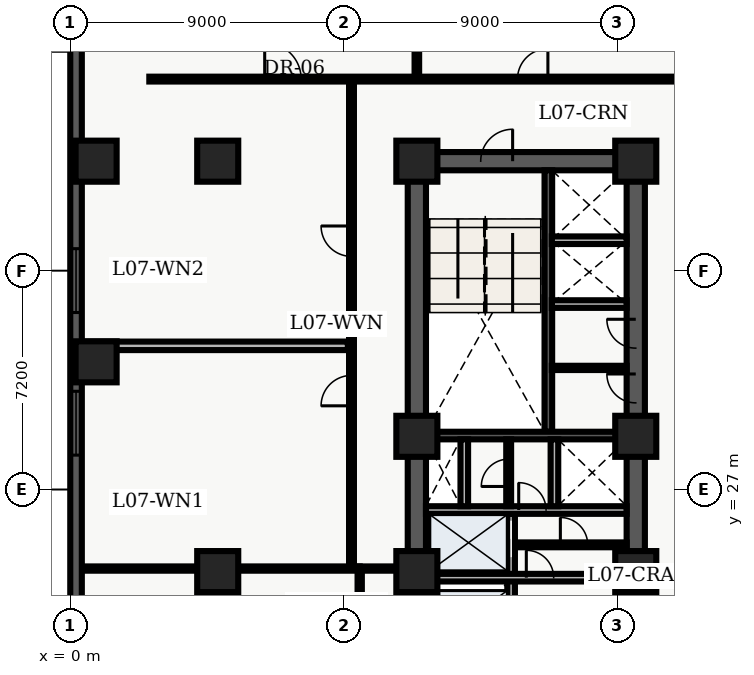
"""IFC4 building model, lengths in metres.
Left out: names, types, materials, properties, quantities, classifications, styles, units other than length and angle.
Written with IfcOpenShell. Run it as: python <this file> out.ifc"""

import sys

from ifc_helpers import new_model, entity, si_unit, converted_unit, direction, frame, origin_with_axes, origin_2d_with_axis, place, context, subcontext, project, spatial, polyline, rectangle, outline, extrude, element, fill, save


model = new_model("IFC4")
c1 = context("Model", 3, precision=1e-05, world=origin_with_axes(), true_north=direction((0.0, 1.0)))
c2 = subcontext(c1, "Body", "Model", "MODEL_VIEW")
j1 = project(units=[si_unit("LENGTHUNIT", "METRE"), converted_unit("PLANEANGLEUNIT", "DEGREE", entity("IfcPlaneAngleMeasure", 0.017), si_unit("PLANEANGLEUNIT", "RADIAN"), dimensions=[0, 0, 0, 0, 0, 0, 0])], contexts=[c1])
p1 = place(None, origin_with_axes())
s1 = spatial("IfcSite", under=j1, at=p1, CompositionType="ELEMENT")
p2 = place(p1, origin_with_axes())
s2 = spatial("IfcBuilding", under=s1, at=p2, CompositionType="ELEMENT")
p3 = place(p2, frame((0.0, 0.0, 32.7), z_axis=(0.0, 0.0, 1.0), x_axis=(1.0, 0.0, 0.0)))
s3 = spatial("IfcBuildingStorey", under=s2, at=p3, CompositionType="ELEMENT", Elevation=32.7)
p4 = place(p3, frame((11.4, 10.8, 0.0), z_axis=(0.0, 0.0, 1.0), x_axis=(0.0, 1.0, 0.0)))
e1 = element("IfcWall", 1, at=p4, inside=s3, PredefinedType="SHEAR", context=c2, shape_type="SweptSolid", body=[
    extrude(outline(polyline([(0.0, -0.3), (27.0, -0.3), (27.0, 0.3), (0.0, 0.3), (0.0, -0.3)])), origin_with_axes(), (0.0, 0.0, 1.0), 3.66),
])
p5 = place(p3, frame((11.4, 37.8, 0.0), z_axis=(0.0, 0.0, 1.0), x_axis=(1.0, 0.0, 0.0)))
e2 = element("IfcWall", 2, at=p5, inside=s3, PredefinedType="SHEAR", context=c2, shape_type="SweptSolid", body=[
    extrude(outline(polyline([(0.0, -0.3), (7.2, -0.3), (7.2, 0.3), (0.0, 0.3), (0.0, -0.3)])), origin_with_axes(), (0.0, 0.0, 1.0), 3.66),
])
p6 = place(p5, frame((2.625, 0.0, 0.0), z_axis=(0.0, 0.0, 1.0), x_axis=(1.0, 0.0, 0.0)))
e3 = element("IfcOpeningElement", 3, at=p6, cuts=e2, PredefinedType="OPENING", context=c2, shape_type="SweptSolid", body=[
    extrude(rectangle(XDim=1.05, YDim=0.62, at=origin_2d_with_axis()), origin_with_axes(), (0.0, 0.0, 1.0), 2.15),
])
p7 = place(p3, frame((18.6, 10.8, 0.0), z_axis=(0.0, 0.0, 1.0), x_axis=(0.0, 1.0, 0.0)))
e4 = element("IfcWall", 4, at=p7, inside=s3, PredefinedType="SHEAR", context=c2, shape_type="SweptSolid", body=[
    extrude(outline(polyline([(0.0, -0.3), (13.5, -0.3), (13.5, 0.3), (0.0, 0.3), (0.0, -0.3)])), origin_with_axes(), (0.0, 0.0, 1.0), 3.66),
])
p8 = place(p7, frame((1.3, 0.0, 0.0), z_axis=(0.0, 0.0, 1.0), x_axis=(1.0, 0.0, 0.0)))
e5 = element("IfcOpeningElement", 5, at=p8, cuts=e4, PredefinedType="OPENING", context=c2, shape_type="SweptSolid", body=[
    extrude(rectangle(XDim=1.1, YDim=0.62, at=origin_2d_with_axis()), origin_with_axes(), (0.0, 0.0, 1.0), 2.15),
])
p9 = place(p7, frame((3.4, 0.0, 0.0), z_axis=(0.0, 0.0, 1.0), x_axis=(1.0, 0.0, 0.0)))
e6 = element("IfcOpeningElement", 6, at=p9, cuts=e4, PredefinedType="OPENING", context=c2, shape_type="SweptSolid", body=[
    extrude(rectangle(XDim=1.1, YDim=0.62, at=origin_2d_with_axis()), origin_with_axes(), (0.0, 0.0, 1.0), 2.15),
])
p10 = place(p7, frame((11.125, 0.0, 0.0), z_axis=(0.0, 0.0, 1.0), x_axis=(1.0, 0.0, 0.0)))
e7 = element("IfcOpeningElement", 7, at=p10, cuts=e4, PredefinedType="OPENING", context=c2, shape_type="SweptSolid", body=[
    extrude(rectangle(XDim=1.05, YDim=0.62, at=origin_2d_with_axis()), origin_with_axes(), (0.0, 0.0, 1.0), 2.15),
])
p11 = place(p3, frame((18.6, 24.3, 0.0), z_axis=(0.0, 0.0, 1.0), x_axis=(0.0, 1.0, 0.0)))
e8 = element("IfcWall", 8, at=p11, inside=s3, PredefinedType="SHEAR", context=c2, shape_type="SweptSolid", body=[
    extrude(outline(polyline([(0.0, -0.3), (13.5, -0.3), (13.5, 0.3), (0.0, 0.3), (0.0, -0.3)])), origin_with_axes(), (0.0, 0.0, 1.0), 3.66),
])
p12 = place(p11, frame((6.025, 0.0, 0.0), z_axis=(0.0, 0.0, 1.0), x_axis=(1.0, 0.0, 0.0)))
e9 = element("IfcOpeningElement", 9, at=p12, cuts=e8, PredefinedType="OPENING", context=c2, shape_type="SweptSolid", body=[
    extrude(rectangle(XDim=0.95, YDim=0.62, at=origin_2d_with_axis()), origin_with_axes(), (0.0, 0.0, 1.0), 2.15),
])
p13 = place(p11, frame((7.825, 0.0, 0.0), z_axis=(0.0, 0.0, 1.0), x_axis=(1.0, 0.0, 0.0)))
e10 = element("IfcOpeningElement", 10, at=p13, cuts=e8, PredefinedType="OPENING", context=c2, shape_type="SweptSolid", body=[
    extrude(rectangle(XDim=0.95, YDim=0.62, at=origin_2d_with_axis()), origin_with_axes(), (0.0, 0.0, 1.0), 2.15),
])
p14 = place(p3, frame((15.725, 28.9, 0.0), z_axis=(0.0, 0.0, 1.0), x_axis=(0.0, 1.0, 0.0)))
e11 = element("IfcWall", 11, at=p14, inside=s3, PredefinedType="SHEAR", context=c2, shape_type="SweptSolid", body=[
    extrude(outline(polyline([(0.0, -0.125), (8.6, -0.125), (8.6, 0.125), (0.0, 0.125), (0.0, -0.125)])), origin_with_axes(), (0.0, 0.0, 1.0), 3.66),
])
p15 = place(p3, frame((11.7, 28.775, 0.0), z_axis=(0.0, 0.0, 1.0), x_axis=(1.0, 0.0, 0.0)))
e12 = element("IfcWall", 12, at=p15, inside=s3, PredefinedType="SHEAR", context=c2, shape_type="SweptSolid", body=[
    extrude(outline(polyline([(0.0, -0.125), (6.6, -0.125), (6.6, 0.125), (0.0, 0.125), (0.0, -0.125)])), origin_with_axes(), (0.0, 0.0, 1.0), 3.66),
])
p16 = place(p3, frame((14.5, 19.95, 0.0), z_axis=(0.0, 0.0, 1.0), x_axis=(0.0, 1.0, 0.0)))
e13 = element("IfcWall", 13, at=p16, inside=s3, PredefinedType="SOLIDWALL", context=c2, shape_type="SweptSolid", body=[
    extrude(outline(polyline([(0.0, -0.125), (6.25, -0.125), (6.25, 0.125), (0.0, 0.125), (0.0, -0.125)])), origin_with_axes(), (0.0, 0.0, 1.0), 2.7),
])
p17 = place(p16, frame((1.025, 0.0, 0.0), z_axis=(0.0, 0.0, 1.0), x_axis=(1.0, 0.0, 0.0)))
e14 = element("IfcOpeningElement", 14, at=p17, cuts=e13, PredefinedType="OPENING", context=c2, shape_type="SweptSolid", body=[
    extrude(rectangle(XDim=1.1, YDim=0.27, at=origin_2d_with_axis()), origin_with_axes(), (0.0, 0.0, 1.0), 2.15),
])
p18 = place(p16, frame((2.975, 0.0, 0.0), z_axis=(0.0, 0.0, 1.0), x_axis=(1.0, 0.0, 0.0)))
e15 = element("IfcOpeningElement", 15, at=p18, cuts=e13, PredefinedType="OPENING", context=c2, shape_type="SweptSolid", body=[
    extrude(rectangle(XDim=1.1, YDim=0.27, at=origin_2d_with_axis()), origin_with_axes(), (0.0, 0.0, 1.0), 2.15),
])
p19 = place(p16, frame((5.425, 0.0, 0.0), z_axis=(0.0, 0.0, 1.0), x_axis=(1.0, 0.0, 0.0)))
e16 = element("IfcOpeningElement", 16, at=p19, cuts=e13, PredefinedType="OPENING", context=c2, shape_type="SweptSolid", body=[
    extrude(rectangle(XDim=1.2, YDim=0.27, at=origin_2d_with_axis()), origin_with_axes(), (0.0, 0.0, 1.0), 2.15),
])
p20 = place(p3, frame((11.7, 24.1, 0.0), z_axis=(0.0, 0.0, 1.0), x_axis=(1.0, 0.0, 0.0)))
e17 = element("IfcWall", 17, at=p20, inside=s3, PredefinedType="SOLIDWALL", context=c2, shape_type="SweptSolid", body=[
    extrude(outline(polyline([(0.0, -0.125), (6.6, -0.125), (6.6, 0.125), (0.0, 0.125), (0.0, -0.125)])), origin_with_axes(), (0.0, 0.0, 1.0), 2.7),
])
p21 = place(p20, frame((3.75, 0.0, 0.0), z_axis=(0.0, 0.0, 1.0), x_axis=(1.0, 0.0, 0.0)))
e18 = element("IfcOpeningElement", 18, at=p21, cuts=e17, PredefinedType="OPENING", context=c2, shape_type="SweptSolid", body=[
    extrude(rectangle(XDim=0.9, YDim=0.27, at=origin_2d_with_axis()), origin_with_axes(), (0.0, 0.0, 1.0), 2.15),
])
p22 = place(p3, frame((11.7, 26.325, 0.0), z_axis=(0.0, 0.0, 1.0), x_axis=(1.0, 0.0, 0.0)))
e19 = element("IfcWall", 19, at=p22, inside=s3, PredefinedType="SOLIDWALL", context=c2, shape_type="SweptSolid", body=[
    extrude(outline(polyline([(0.0, -0.125), (6.6, -0.125), (6.6, 0.125), (0.0, 0.125), (0.0, -0.125)])), origin_with_axes(), (0.0, 0.0, 1.0), 2.7),
])
p23 = place(p22, frame((3.5, 0.0, 0.0), z_axis=(0.0, 0.0, 1.0), x_axis=(1.0, 0.0, 0.0)))
e20 = element("IfcOpeningElement", 20, at=p23, cuts=e19, PredefinedType="OPENING", context=c2, shape_type="SweptSolid", body=[
    extrude(rectangle(XDim=0.9, YDim=0.27, at=origin_2d_with_axis()), origin_with_axes(), (0.0, 0.0, 1.0), 2.15),
])
for number, where, z_axis, x_axis in (
    (21, (12.96, 26.45, 0.0), (0.0, 0.0, 1.0), (0.0, 1.0, 0.0)),
    (22, (15.925, 26.45, 0.0), (0.0, 0.0, 1.0), (0.0, 1.0, 0.0)),
):
    element("IfcWall", number, at=place(p3, frame(where, z_axis=z_axis, x_axis=x_axis)), inside=s3, PredefinedType="SOLIDWALL", context=c2, shape_type="SweptSolid", body=[
        extrude(outline(polyline([(0.0, -0.125), (2.2, -0.125), (2.2, 0.125), (0.0, 0.125), (0.0, -0.125)])), origin_with_axes(), (0.0, 0.0, 1.0), 2.7),
    ])
for number, where, z_axis, x_axis in (
    (23, (11.4, 24.3, 0.0), (0.0, 0.0, 1.0), (1.0, 0.0, 0.0)),
    (24, (11.4, 28.75, 0.0), (0.0, 0.0, 1.0), (1.0, 0.0, 0.0)),
    (25, (11.4, 37.8, 0.0), (0.0, 0.0, 1.0), (1.0, 0.0, 0.0)),
    (26, (18.6, 24.3, 0.0), (0.0, 0.0, 1.0), (1.0, 0.0, 0.0)),
    (27, (18.6, 28.75, 0.0), (0.0, 0.0, 1.0), (1.0, 0.0, 0.0)),
    (28, (18.6, 37.8, 0.0), (0.0, 0.0, 1.0), (1.0, 0.0, 0.0)),
    (29, (4.85, 24.3, 0.0), (0.0, 0.0, 1.0), (1.0, 0.0, 0.0)),
    (30, (4.85, 37.8, 0.0), (0.0, 0.0, 1.0), (1.0, 0.0, 0.0)),
    (31, (0.85, 31.2, 0.0), (0.0, 0.0, 1.0), (1.0, 0.0, 0.0)),
    (32, (0.85, 37.8, 0.0), (0.0, 0.0, 1.0), (1.0, 0.0, 0.0)),
):
    element("IfcColumn", number, at=place(p3, frame(where, z_axis=z_axis, x_axis=x_axis)), inside=s3, PredefinedType="COLUMN", context=c2, shape_type="SweptSolid", body=[
        extrude(rectangle(XDim=1.35, YDim=1.35, at=origin_2d_with_axis()), origin_with_axes(), (0.0, 0.0, 1.0), 3.9),
    ])
p24 = place(p3, frame((14.62, 25.18, 0.0), z_axis=(0.0, 0.0, 1.0), x_axis=(1.0, 0.0, 0.0)))
e33 = element("IfcWall", 33, at=p24, inside=s3, PredefinedType="PARTITIONING", context=c2, shape_type="SweptSolid", body=[
    extrude(outline(polyline([(0.0, -0.08), (3.68, -0.08), (3.68, 0.08), (0.0, 0.08), (0.0, -0.08)])), origin_with_axes(), (0.0, 0.0, 1.0), 2.7),
])
p25 = place(p24, frame((1.95, 0.0, 0.0), z_axis=(0.0, 0.0, 1.0), x_axis=(1.0, 0.0, 0.0)))
e34 = element("IfcOpeningElement", 34, at=p25, cuts=e33, PredefinedType="OPENING", context=c2, shape_type="SweptSolid", body=[
    extrude(rectangle(XDim=0.9, YDim=0.18, at=origin_2d_with_axis()), origin_with_axes(), (0.0, 0.0, 1.0), 2.15),
])
p26 = place(p3, frame((14.42, 26.45, 0.0), z_axis=(0.0, 0.0, 1.0), x_axis=(0.0, 1.0, 0.0)))
e35 = element("IfcWall", 35, at=p26, inside=s3, PredefinedType="PARTITIONING", context=c2, shape_type="SweptSolid", body=[
    extrude(outline(polyline([(0.0, -0.08), (2.2, -0.08), (2.2, 0.08), (0.0, 0.08), (0.0, -0.08)])), origin_with_axes(), (0.0, 0.0, 1.0), 2.7),
])
p27 = place(p26, frame((1.1, 0.0, 0.0), z_axis=(0.0, 0.0, 1.0), x_axis=(1.0, 0.0, 0.0)))
e36 = element("IfcOpeningElement", 36, at=p27, cuts=e35, PredefinedType="OPENING", context=c2, shape_type="SweptSolid", body=[
    extrude(rectangle(XDim=0.9, YDim=0.18, at=origin_2d_with_axis()), origin_with_axes(), (0.0, 0.0, 1.0), 2.15),
])
for number, where, z_axis, x_axis in (
    (37, (15.84, 33.1, 0.0), (0.0, 0.0, 1.0), (1.0, 0.0, 0.0)),
    (38, (15.84, 35.2, 0.0), (0.0, 0.0, 1.0), (1.0, 0.0, 0.0)),
):
    element("IfcWall", number, at=place(p3, frame(where, z_axis=z_axis, x_axis=x_axis)), inside=s3, PredefinedType="SOLIDWALL", context=c2, shape_type="SweptSolid", body=[
        extrude(outline(polyline([(0.0, -0.125), (2.46, -0.125), (2.46, 0.125), (0.0, 0.125), (0.0, -0.125)])), origin_with_axes(), (0.0, 0.0, 1.0), 2.7),
    ])
p28 = place(p3, frame((15.84, 31.0, 0.0), z_axis=(0.0, 0.0, 1.0), x_axis=(1.0, 0.0, 0.0)))
e39 = element("IfcWall", 39, at=p28, inside=s3, PredefinedType="PARTITIONING", context=c2, shape_type="SweptSolid", body=[
    extrude(outline(polyline([(0.0, -0.07), (2.46, -0.07), (2.46, 0.07), (0.0, 0.07), (0.0, -0.07)])), origin_with_axes(), (0.0, 0.0, 1.0), 2.7),
])
p29 = place(p3, frame((9.52, 20.4, 0.0), z_axis=(0.0, 0.0, 1.0), x_axis=(0.0, 1.0, 0.0)))
e40 = element("IfcWall", 40, at=p29, inside=s3, PredefinedType="PARTITIONING", context=c2, shape_type="SweptSolid", body=[
    extrude(outline(polyline([(0.0, -0.07), (4.0, -0.07), (4.0, 0.07), (0.0, 0.07), (0.0, -0.07)])), origin_with_axes(), (0.0, 0.0, 1.0), 2.7),
])
p30 = place(p3, frame((9.52, 24.4, 0.0), z_axis=(0.0, 0.0, 1.0), x_axis=(1.0, 0.0, 0.0)))
e41 = element("IfcWall", 41, at=p30, inside=s3, PredefinedType="PARTITIONING", context=c2, shape_type="SweptSolid", body=[
    extrude(outline(polyline([(0.0, -0.07), (1.58, -0.07), (1.58, 0.07), (0.0, 0.07), (0.0, -0.07)])), origin_with_axes(), (0.0, 0.0, 1.0), 2.7),
])
p31 = place(p3, frame((2.6, 40.5, 0.0), z_axis=(0.0, 0.0, 1.0), x_axis=(1.0, 0.0, 0.0)))
e42 = element("IfcWall", 42, at=p31, inside=s3, PredefinedType="PARTITIONING", context=c2, shape_type="SweptSolid", body=[
    extrude(outline(polyline([(0.0, -0.08), (18.65, -0.08), (18.65, 0.08), (0.0, 0.08), (0.0, -0.08)])), origin_with_axes(), (0.0, 0.0, 1.0), 2.7),
])
p32 = place(p31, frame((4.395, 0.0, 0.0), z_axis=(0.0, 0.0, 1.0), x_axis=(1.0, 0.0, 0.0)))
e43 = element("IfcOpeningElement", 43, at=p32, cuts=e42, PredefinedType="OPENING", context=c2, shape_type="SweptSolid", body=[
    extrude(rectangle(XDim=1.2, YDim=0.18, at=origin_2d_with_axis()), origin_with_axes(), (0.0, 0.0, 1.0), 2.2),
])
p33 = place(p31, frame((12.61, 0.0, 0.0), z_axis=(0.0, 0.0, 1.0), x_axis=(1.0, 0.0, 0.0)))
e44 = element("IfcOpeningElement", 44, at=p33, cuts=e42, PredefinedType="OPENING", context=c2, shape_type="SweptSolid", body=[
    extrude(rectangle(XDim=1.0, YDim=0.18, at=origin_2d_with_axis()), origin_with_axes(), (0.0, 0.0, 1.0), 2.15),
])
p34 = place(p3, frame((9.25, 24.4, 0.0), z_axis=(0.0, 0.0, 1.0), x_axis=(0.0, 1.0, 0.0)))
e45 = element("IfcWall", 45, at=p34, inside=s3, PredefinedType="PARTITIONING", context=c2, shape_type="SweptSolid", body=[
    extrude(outline(polyline([(0.0, -0.08), (16.1, -0.08), (16.1, 0.08), (0.0, 0.08), (0.0, -0.08)])), origin_with_axes(), (0.0, 0.0, 1.0), 2.7),
])
p35 = place(p34, frame((5.853, 0.0, 0.0), z_axis=(0.0, 0.0, 1.0), x_axis=(1.0, 0.0, 0.0)))
e46 = element("IfcOpeningElement", 46, at=p35, cuts=e45, PredefinedType="OPENING", context=c2, shape_type="SweptSolid", body=[
    extrude(rectangle(XDim=1.0, YDim=0.18, at=origin_2d_with_axis()), origin_with_axes(), (0.0, 0.0, 1.0), 2.15),
])
p36 = place(p34, frame((10.768, 0.0, 0.0), z_axis=(0.0, 0.0, 1.0), x_axis=(1.0, 0.0, 0.0)))
e47 = element("IfcOpeningElement", 47, at=p36, cuts=e45, PredefinedType="OPENING", context=c2, shape_type="SweptSolid", body=[
    extrude(rectangle(XDim=1.0, YDim=0.18, at=origin_2d_with_axis()), origin_with_axes(), (0.0, 0.0, 1.0), 2.15),
])
p37 = place(p3, frame((0.36, 24.4, 0.0), z_axis=(0.0, 0.0, 1.0), x_axis=(1.0, 0.0, 0.0)))
e48 = element("IfcWall", 48, at=p37, inside=s3, PredefinedType="PARTITIONING", context=c2, shape_type="SweptSolid", body=[
    extrude(outline(polyline([(0.0, -0.07), (9.16, -0.07), (9.16, 0.07), (0.0, 0.07), (0.0, -0.07)])), origin_with_axes(), (0.0, 0.0, 1.0), 2.7),
])
p38 = place(p3, frame((0.375, 31.726, 0.0), z_axis=(0.0, 0.0, 1.0), x_axis=(1.0, 0.0, 0.0)))
e49 = element("IfcWall", 49, at=p38, inside=s3, PredefinedType="PARTITIONING", context=c2, shape_type="SweptSolid", body=[
    extrude(outline(polyline([(0.0, -0.14), (8.755, -0.14), (8.755, 0.14), (0.0, 0.14), (0.0, -0.14)])), origin_with_axes(), (0.0, 0.0, 1.0), 2.7),
])
p39 = place(p3, frame((11.4, 40.6, 0.0), z_axis=(0.0, 0.0, 1.0), x_axis=(0.0, 1.0, 0.0)))
e50 = element("IfcWall", 50, at=p39, inside=s3, PredefinedType="PARTITIONING", context=c2, shape_type="SweptSolid", body=[
    extrude(outline(polyline([(0.0, -0.075), (7.64, -0.075), (7.64, 0.075), (0.0, 0.075), (0.0, -0.075)])), origin_with_axes(), (0.0, 0.0, 1.0), 2.7),
])
p40 = place(p3, frame((0.19, 2.78, 0.0), z_axis=(0.0, 0.0, 1.0), x_axis=(0.0, 1.0, 0.0)))
e51 = element("IfcWall", 51, at=p40, inside=s3, PredefinedType="SOLIDWALL", context=c2, shape_type="SweptSolid", body=[
    extrude(outline(polyline([(0.0, -0.19), (43.42, -0.19), (43.42, 0.19), (0.0, 0.19), (0.0, -0.19)])), origin_with_axes(), (0.0, 0.0, 1.0), 3.66),
])
p41 = place(p40, frame((2.946, 0.0, 0.45), z_axis=(0.0, 0.0, 1.0), x_axis=(1.0, 0.0, 0.0)))
e52 = element("IfcOpeningElement", 52, at=p41, cuts=e51, PredefinedType="OPENING", context=c2, shape_type="SweptSolid", body=[
    extrude(rectangle(XDim=2.1, YDim=0.4, at=origin_2d_with_axis()), origin_with_axes(), (0.0, 0.0, 1.0), 2.2),
])
p42 = place(p40, frame((12.328, 0.0, 0.45), z_axis=(0.0, 0.0, 1.0), x_axis=(1.0, 0.0, 0.0)))
e53 = element("IfcOpeningElement", 53, at=p42, cuts=e51, PredefinedType="OPENING", context=c2, shape_type="SweptSolid", body=[
    extrude(rectangle(XDim=2.1, YDim=0.4, at=origin_2d_with_axis()), origin_with_axes(), (0.0, 0.0, 1.0), 2.2),
])
p43 = place(p40, frame((26.401, 0.0, 0.45), z_axis=(0.0, 0.0, 1.0), x_axis=(1.0, 0.0, 0.0)))
e54 = element("IfcOpeningElement", 54, at=p43, cuts=e51, PredefinedType="OPENING", context=c2, shape_type="SweptSolid", body=[
    extrude(rectangle(XDim=2.1, YDim=0.4, at=origin_2d_with_axis()), origin_with_axes(), (0.0, 0.0, 1.0), 2.2),
])
p44 = place(p40, frame((31.092, 0.0, 0.45), z_axis=(0.0, 0.0, 1.0), x_axis=(1.0, 0.0, 0.0)))
e55 = element("IfcOpeningElement", 55, at=p44, cuts=e51, PredefinedType="OPENING", context=c2, shape_type="SweptSolid", body=[
    extrude(rectangle(XDim=2.1, YDim=0.4, at=origin_2d_with_axis()), origin_with_axes(), (0.0, 0.0, 1.0), 2.2),
])
p45 = place(p40, frame((40.024, 0.0, 0.45), z_axis=(0.0, 0.0, 1.0), x_axis=(1.0, 0.0, 0.0)))
e56 = element("IfcOpeningElement", 56, at=p45, cuts=e51, PredefinedType="OPENING", context=c2, shape_type="SweptSolid", body=[
    extrude(rectangle(XDim=2.1, YDim=0.4, at=origin_2d_with_axis()), origin_with_axes(), (0.0, 0.0, 1.0), 2.2),
])
p46 = place(p16, frame((5.425, 0.0, 0.0), z_axis=(0.0, 0.0, 1.0), x_axis=(1.0, 0.0, 0.0)))
e57 = element("IfcDoor", 57, at=p46, inside=s3, OperationType="DOUBLE_DOOR_SLIDING", PredefinedType="DOOR", context=c2, shape_type="SweptSolid", body=[
    extrude(rectangle(XDim=1.2, YDim=0.09, at=origin_2d_with_axis()), origin_with_axes(), (0.0, 0.0, 1.0), 2.15),
])
fill(e16, e57)
p47 = place(p5, frame((2.625, 0.0, 0.0), z_axis=(0.0, 0.0, 1.0), x_axis=(1.0, 0.0, 0.0)))
e58 = element("IfcDoor", 58, at=p47, inside=s3, OperationType="SINGLE_SWING_RIGHT", PredefinedType="DOOR", context=c2, shape_type="SweptSolid", body=[
    extrude(rectangle(XDim=1.05, YDim=0.09, at=origin_2d_with_axis()), origin_with_axes(), (0.0, 0.0, 1.0), 2.15),
])
fill(e3, e58)
p48 = place(p22, frame((3.5, 0.0, 0.0), z_axis=(0.0, 0.0, 1.0), x_axis=(1.0, 0.0, 0.0)))
e59 = element("IfcDoor", 59, at=p48, inside=s3, OperationType="SINGLE_SWING_LEFT", PredefinedType="DOOR", context=c2, shape_type="SweptSolid", body=[
    extrude(rectangle(XDim=0.9, YDim=0.09, at=origin_2d_with_axis()), origin_with_axes(), (0.0, 0.0, 1.0), 2.15),
])
fill(e20, e59)
p49 = place(p26, frame((1.1, 0.0, 0.0), z_axis=(0.0, 0.0, 1.0), x_axis=(1.0, 0.0, 0.0)))
e60 = element("IfcDoor", 60, at=p49, inside=s3, OperationType="SINGLE_SWING_LEFT", PredefinedType="DOOR", context=c2, shape_type="SweptSolid", body=[
    extrude(rectangle(XDim=0.9, YDim=0.09, at=origin_2d_with_axis()), origin_with_axes(), (0.0, 0.0, 1.0), 2.15),
])
fill(e36, e60)
p50 = place(p20, frame((3.75, 0.0, 0.0), z_axis=(0.0, 0.0, 1.0), x_axis=(1.0, 0.0, 0.0)))
e61 = element("IfcDoor", 61, at=p50, inside=s3, OperationType="SINGLE_SWING_LEFT", PredefinedType="DOOR", context=c2, shape_type="SweptSolid", body=[
    extrude(rectangle(XDim=0.9, YDim=0.09, at=origin_2d_with_axis()), origin_with_axes(), (0.0, 0.0, 1.0), 2.15),
])
fill(e18, e61)
p51 = place(p24, frame((1.95, 0.0, 0.0), z_axis=(0.0, 0.0, 1.0), x_axis=(1.0, 0.0, 0.0)))
e62 = element("IfcDoor", 62, at=p51, inside=s3, OperationType="SINGLE_SWING_LEFT", PredefinedType="DOOR", context=c2, shape_type="SweptSolid", body=[
    extrude(rectangle(XDim=0.9, YDim=0.09, at=origin_2d_with_axis()), origin_with_axes(), (0.0, 0.0, 1.0), 2.15),
])
fill(e34, e62)
p52 = place(p11, frame((6.025, 0.0, 0.0), z_axis=(0.0, 0.0, 1.0), x_axis=(1.0, 0.0, 0.0)))
e63 = element("IfcDoor", 63, at=p52, inside=s3, OperationType="SINGLE_SWING_RIGHT", PredefinedType="DOOR", context=c2, shape_type="SweptSolid", body=[
    extrude(rectangle(XDim=0.95, YDim=0.09, at=origin_2d_with_axis()), origin_with_axes(), (0.0, 0.0, 1.0), 2.15),
])
fill(e9, e63)
p53 = place(p11, frame((7.825, 0.0, 0.0), z_axis=(0.0, 0.0, 1.0), x_axis=(1.0, 0.0, 0.0)))
e64 = element("IfcDoor", 64, at=p53, inside=s3, OperationType="SINGLE_SWING_RIGHT", PredefinedType="DOOR", context=c2, shape_type="SweptSolid", body=[
    extrude(rectangle(XDim=0.95, YDim=0.09, at=origin_2d_with_axis()), origin_with_axes(), (0.0, 0.0, 1.0), 2.15),
])
fill(e10, e64)
p54 = place(p34, frame((5.853, 0.0, 0.0), z_axis=(0.0, 0.0, 1.0), x_axis=(1.0, 0.0, 0.0)))
e65 = element("IfcDoor", 65, at=p54, inside=s3, OperationType="SINGLE_SWING_LEFT", PredefinedType="DOOR", context=c2, shape_type="SweptSolid", body=[
    extrude(rectangle(XDim=1.0, YDim=0.09, at=origin_2d_with_axis()), origin_with_axes(), (0.0, 0.0, 1.0), 2.15),
])
fill(e46, e65)
p55 = place(p34, frame((10.768, 0.0, 0.0), z_axis=(0.0, 0.0, 1.0), x_axis=(1.0, 0.0, 0.0)))
e66 = element("IfcDoor", 66, at=p55, inside=s3, OperationType="SINGLE_SWING_RIGHT", PredefinedType="DOOR", context=c2, shape_type="SweptSolid", body=[
    extrude(rectangle(XDim=1.0, YDim=0.09, at=origin_2d_with_axis()), origin_with_axes(), (0.0, 0.0, 1.0), 2.15),
])
fill(e47, e66)
p56 = place(p31, frame((4.395, 0.0, 0.0), z_axis=(0.0, 0.0, 1.0), x_axis=(1.0, 0.0, 0.0)))
e67 = element("IfcDoor", 67, at=p56, inside=s3, OperationType="SINGLE_SWING_LEFT", PredefinedType="DOOR", context=c2, shape_type="SweptSolid", body=[
    extrude(rectangle(XDim=1.2, YDim=0.09, at=origin_2d_with_axis()), origin_with_axes(), (0.0, 0.0, 1.0), 2.2),
])
fill(e43, e67)
p57 = place(p31, frame((12.61, 0.0, 0.0), z_axis=(0.0, 0.0, 1.0), x_axis=(1.0, 0.0, 0.0)))
e68 = element("IfcDoor", 68, at=p57, inside=s3, OperationType="SINGLE_SWING_RIGHT", PredefinedType="DOOR", context=c2, shape_type="SweptSolid", body=[
    extrude(rectangle(XDim=1.0, YDim=0.09, at=origin_2d_with_axis()), origin_with_axes(), (0.0, 0.0, 1.0), 2.15),
])
fill(e44, e68)
p58 = place(p40, frame((26.401, 0.0, 0.45), z_axis=(0.0, 0.0, 1.0), x_axis=(1.0, 0.0, 0.0)))
e69 = element("IfcWindow", 69, at=p58, inside=s3, PredefinedType="WINDOW", context=c2, shape_type="SweptSolid", body=[
    extrude(rectangle(XDim=2.1, YDim=0.09, at=origin_2d_with_axis()), origin_with_axes(), (0.0, 0.0, 1.0), 2.2),
])
fill(e54, e69)
p59 = place(p40, frame((31.092, 0.0, 0.45), z_axis=(0.0, 0.0, 1.0), x_axis=(1.0, 0.0, 0.0)))
e70 = element("IfcWindow", 70, at=p59, inside=s3, PredefinedType="WINDOW", context=c2, shape_type="SweptSolid", body=[
    extrude(rectangle(XDim=2.1, YDim=0.09, at=origin_2d_with_axis()), origin_with_axes(), (0.0, 0.0, 1.0), 2.2),
])
fill(e55, e70)
save(model, sys.argv[1])
